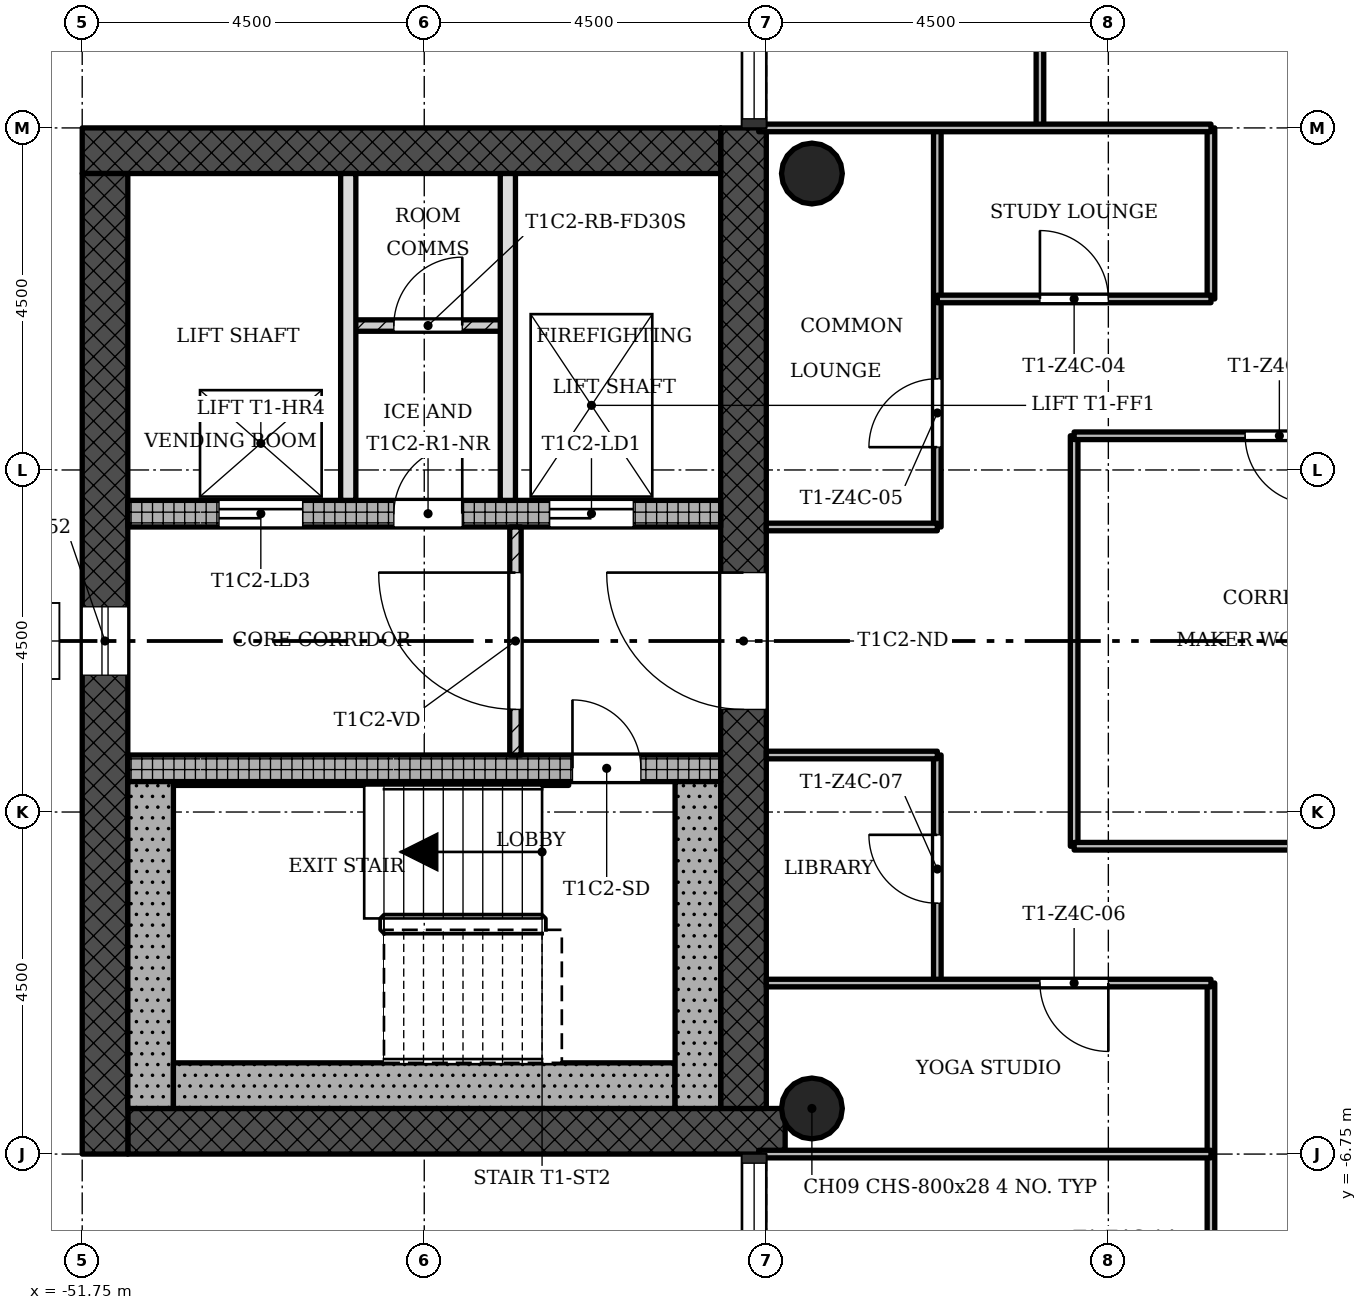
"""IFC4 building model, lengths in metres.
Left out: names, types, materials, properties, quantities, classifications, styles, units other than length and angle.
Written with IfcOpenShell. Run it as: python <this file> out.ifc"""

import sys

from ifc_helpers import new_model, si_unit, direction, frame, frame_2d, origin, origin_2d, place, context, subcontext, project, spatial, rectangle, hollow_circle, extrude, element, fill, save


model = new_model("IFC4")
c1 = context("Model", 3, precision=1e-05, world=origin(), true_north=direction((0.0, 1.0)))
c2 = subcontext(c1, "Body", "Model", "MODEL_VIEW")
j1 = project(units=[si_unit("LENGTHUNIT", "METRE"), si_unit("PLANEANGLEUNIT", "RADIAN")], contexts=[c1])
p1 = place(None, origin())
s1 = spatial("IfcSite", under=j1, at=p1, CompositionType="ELEMENT")
p2 = place(p1, origin())
s2 = spatial("IfcBuilding", under=s1, at=p2, CompositionType="ELEMENT")
p3 = place(p2, frame((0.0, 0.0, 189.2)))
s3 = spatial("IfcBuildingStorey", under=s2, at=p3, CompositionType="ELEMENT", Elevation=189.2)
p4 = place(p3, frame((-51.15, -6.45, 0.0), z_axis=(0.0, 0.0, 1.0), x_axis=(1.0, 0.0, 0.0)))
e1 = element("IfcWall", 1, at=p4, inside=s3, PredefinedType="SHEAR", context=c2, shape_type="SweptSolid", body=[
    extrude(rectangle(XDim=8.648, YDim=0.6, at=frame_2d((4.324, 0.0))), origin(), (0.0, 0.0, 1.0), 3.4),
])
p5 = place(p3, frame((-43.05, -6.15, 0.0), z_axis=(0.0, 0.0, 1.0), x_axis=(0.0, 1.0, 0.0)))
e2 = element("IfcWall", 2, at=p5, inside=s3, PredefinedType="SHEAR", context=c2, shape_type="SweptSolid", body=[
    extrude(rectangle(XDim=12.9, YDim=0.6, at=frame_2d((6.45, 0.0))), origin(), (0.0, 0.0, 1.0), 3.4),
])
p6 = place(p5, frame((5.25, 0.0, 0.0)))
e3 = element("IfcOpeningElement", 3, at=p6, cuts=e2, PredefinedType="OPENING", context=c2, shape_type="SweptSolid", body=[
    extrude(rectangle(XDim=1.8, YDim=2.1, at=frame_2d((0.9, 1.05))), frame((0.0, 0.31, 0.0), z_axis=(0.0, -1.0, 0.0), x_axis=(1.0, 0.0, 0.0)), (0.0, 0.0, 1.0), 0.62),
])
p7 = place(p3, frame((-43.35, 6.45, 0.0), z_axis=(0.0, 0.0, 1.0), x_axis=(-1.0, 0.0, 0.0)))
e4 = element("IfcWall", 4, at=p7, inside=s3, PredefinedType="SHEAR", context=c2, shape_type="SweptSolid", body=[
    extrude(rectangle(XDim=8.4, YDim=0.6, at=frame_2d((4.2, 0.0))), origin(), (0.0, 0.0, 1.0), 3.4),
])
p8 = place(p3, frame((-51.45, 6.15, 0.0), z_axis=(0.0, 0.0, 1.0), x_axis=(0.0, -1.0, 0.0)))
e5 = element("IfcWall", 5, at=p8, inside=s3, PredefinedType="SHEAR", context=c2, shape_type="SweptSolid", body=[
    extrude(rectangle(XDim=12.9, YDim=0.6, at=frame_2d((6.45, 0.0))), origin(), (0.0, 0.0, 1.0), 3.4),
])
p9 = place(p8, frame((5.7, 0.0, 0.45)))
e6 = element("IfcOpeningElement", 6, at=p9, cuts=e5, PredefinedType="OPENING", context=c2, shape_type="SweptSolid", body=[
    extrude(rectangle(XDim=0.9, YDim=2.4, at=frame_2d((0.45, 1.2))), frame((0.0, 0.31, 0.0), z_axis=(0.0, -1.0, 0.0), x_axis=(1.0, 0.0, 0.0)), (0.0, 0.0, 1.0), 0.62),
])
p10 = place(p3, frame((-51.15, -1.675, 0.0), z_axis=(0.0, 0.0, 1.0), x_axis=(1.0, 0.0, 0.0)))
e7 = element("IfcWall", 7, at=p10, inside=s3, PredefinedType="SHEAR", context=c2, shape_type="SweptSolid", body=[
    extrude(rectangle(XDim=7.8, YDim=0.35, at=frame_2d((3.9, 0.0))), origin(), (0.0, 0.0, 1.0), 3.4),
])
p11 = place(p10, frame((5.85, 0.0, 0.0)))
e8 = element("IfcOpeningElement", 8, at=p11, cuts=e7, PredefinedType="OPENING", context=c2, shape_type="SweptSolid", body=[
    extrude(rectangle(XDim=0.9, YDim=2.1, at=frame_2d((0.45, 1.05))), frame((0.0, 0.185, 0.0), z_axis=(0.0, -1.0, 0.0), x_axis=(1.0, 0.0, 0.0)), (0.0, 0.0, 1.0), 0.37),
])
p12 = place(p3, frame((-51.15, 1.675, 0.0), z_axis=(0.0, 0.0, 1.0), x_axis=(1.0, 0.0, 0.0)))
e9 = element("IfcWall", 9, at=p12, inside=s3, PredefinedType="SHEAR", context=c2, shape_type="SweptSolid", body=[
    extrude(rectangle(XDim=7.8, YDim=0.35, at=frame_2d((3.9, 0.0))), origin(), (0.0, 0.0, 1.0), 3.4),
])
p13 = place(p12, frame((5.55, 0.0, 0.0)))
e10 = element("IfcOpeningElement", 10, at=p13, cuts=e9, PredefinedType="OPENING", context=c2, shape_type="SweptSolid", body=[
    extrude(rectangle(XDim=1.1, YDim=2.1, at=frame_2d((0.55, 1.05))), frame((0.0, 0.185, 0.0), z_axis=(0.0, -1.0, 0.0), x_axis=(1.0, 0.0, 0.0)), (0.0, 0.0, 1.0), 0.37),
])
p14 = place(p12, frame((1.2, 0.0, 0.0)))
e11 = element("IfcOpeningElement", 11, at=p14, cuts=e9, PredefinedType="OPENING", context=c2, shape_type="SweptSolid", body=[
    extrude(rectangle(XDim=1.1, YDim=2.1, at=frame_2d((0.55, 1.05))), frame((0.0, 0.185, 0.0), z_axis=(0.0, -1.0, 0.0), x_axis=(1.0, 0.0, 0.0)), (0.0, 0.0, 1.0), 0.37),
])
p15 = place(p12, frame((3.5, 0.0, 0.0)))
e12 = element("IfcOpeningElement", 12, at=p15, cuts=e9, PredefinedType="OPENING", context=c2, shape_type="SweptSolid", body=[
    extrude(rectangle(XDim=0.9, YDim=2.1, at=frame_2d((0.45, 1.05))), frame((0.0, 0.185, 0.0), z_axis=(0.0, -1.0, 0.0), x_axis=(1.0, 0.0, 0.0)), (0.0, 0.0, 1.0), 0.37),
])
for number, where, z_axis, x_axis in (
    (13, (-42.15, -6.15, 0.0), (0.0, 0.0, 1.0), (1.0, 0.0, 0.0)),
    (14, (-42.15, 6.15, 0.0), (0.0, 0.0, 1.0), (1.0, 0.0, 0.0)),
):
    element("IfcColumn", number, at=place(p3, frame(where, z_axis=z_axis, x_axis=x_axis)), inside=s3, PredefinedType="COLUMN", context=c2, shape_type="SweptSolid", body=[
        extrude(hollow_circle(Radius=0.4, WallThickness=0.028, at=origin_2d()), origin(), (0.0, 0.0, 1.0), 3.4),
    ])
p16 = place(p3, frame((-46.05, 1.5, 0.0), z_axis=(0.0, 0.0, 1.0), x_axis=(0.0, -1.0, 0.0)))
e15 = element("IfcWall", 15, at=p16, inside=s3, PredefinedType="PARTITIONING", context=c2, shape_type="SweptSolid", body=[
    extrude(rectangle(XDim=3.0, YDim=0.15, at=frame_2d((1.5, 0.0))), origin(), (0.0, 0.0, 1.0), 3.0),
])
p17 = place(p16, frame((0.6, 0.0, 0.0)))
e16 = element("IfcOpeningElement", 16, at=p17, cuts=e15, PredefinedType="OPENING", context=c2, shape_type="SweptSolid", body=[
    extrude(rectangle(XDim=1.8, YDim=2.1, at=frame_2d((0.9, 1.05))), frame((0.0, 0.085, 0.0), z_axis=(0.0, -1.0, 0.0), x_axis=(1.0, 0.0, 0.0)), (0.0, 0.0, 1.0), 0.17),
])
for number, where, z_axis, x_axis in (
    (17, (-48.25, 6.15, 0.0), (0.0, 0.0, 1.0), (0.0, -1.0, 0.0)),
    (18, (-46.15, 6.15, 0.0), (0.0, 0.0, 1.0), (0.0, -1.0, 0.0)),
):
    element("IfcWall", number, at=place(p3, frame(where, z_axis=z_axis, x_axis=x_axis)), inside=s3, PredefinedType="SOLIDWALL", context=c2, shape_type="SweptSolid", body=[
        extrude(rectangle(XDim=4.3, YDim=0.2, at=frame_2d((2.15, 0.0))), origin(), (0.0, 0.0, 1.0), 3.0),
    ])
p18 = place(p3, frame((-46.15, 4.15, 0.0), z_axis=(0.0, 0.0, 1.0), x_axis=(-1.0, 0.0, 0.0)))
e19 = element("IfcWall", 19, at=p18, inside=s3, PredefinedType="PARTITIONING", context=c2, shape_type="SweptSolid", body=[
    extrude(rectangle(XDim=2.1, YDim=0.15, at=frame_2d((1.05, 0.0))), origin(), (0.0, 0.0, 1.0), 3.0),
])
p19 = place(p18, frame((0.6, 0.0, 0.0)))
e20 = element("IfcOpeningElement", 20, at=p19, cuts=e19, PredefinedType="OPENING", context=c2, shape_type="SweptSolid", body=[
    extrude(rectangle(XDim=0.9, YDim=2.1, at=frame_2d((0.45, 1.05))), frame((0.0, 0.085, 0.0), z_axis=(0.0, -1.0, 0.0), x_axis=(1.0, 0.0, 0.0)), (0.0, 0.0, 1.0), 0.17),
])
p20 = place(p3, frame((-40.5, -4.5, 0.0), z_axis=(0.0, 0.0, 1.0), x_axis=(0.0, 1.0, 0.0)))
e21 = element("IfcWall", 21, at=p20, inside=s3, PredefinedType="PARTITIONING", context=c2, shape_type="SweptSolid", body=[
    extrude(rectangle(XDim=3.0, YDim=0.1, at=frame_2d((1.5, 0.0))), origin(), (0.0, 0.0, 1.0), 3.0),
])
p21 = place(p20, frame((1.05, 0.0, 0.0)))
e22 = element("IfcOpeningElement", 22, at=p21, cuts=e21, PredefinedType="OPENING", context=c2, shape_type="SweptSolid", body=[
    extrude(rectangle(XDim=0.9, YDim=2.1, at=frame_2d((0.45, 1.05))), frame((0.0, 0.06, 0.0), z_axis=(0.0, -1.0, 0.0), x_axis=(1.0, 0.0, 0.0)), (0.0, 0.0, 1.0), 0.12),
])
p22 = place(p3, frame((-40.5, 1.5, 0.0), z_axis=(0.0, 0.0, 1.0), x_axis=(0.0, 1.0, 0.0)))
e23 = element("IfcWall", 23, at=p22, inside=s3, PredefinedType="PARTITIONING", context=c2, shape_type="SweptSolid", body=[
    extrude(rectangle(XDim=5.25, YDim=0.1, at=frame_2d((2.625, 0.0))), origin(), (0.0, 0.0, 1.0), 3.0),
])
p23 = place(p22, frame((1.05, 0.0, 0.0)))
e24 = element("IfcOpeningElement", 24, at=p23, cuts=e23, PredefinedType="OPENING", context=c2, shape_type="SweptSolid", body=[
    extrude(rectangle(XDim=0.9, YDim=2.1, at=frame_2d((0.45, 1.05))), frame((0.0, 0.06, 0.0), z_axis=(0.0, -1.0, 0.0), x_axis=(1.0, 0.0, 0.0)), (0.0, 0.0, 1.0), 0.12),
])
p24 = place(p3, frame((-39.15, 6.75, 0.0), z_axis=(0.0, 0.0, 1.0), x_axis=(0.0, 1.0, 0.0)))
e25 = element("IfcWall", 25, at=p24, inside=s3, PredefinedType="PARTITIONING", context=c2, shape_type="SweptSolid", body=[
    extrude(rectangle(XDim=4.5, YDim=0.1, at=frame_2d((2.25, 0.0))), origin(), (0.0, 0.0, 1.0), 3.0),
])
p25 = place(p24, frame((1.8, 0.0, 0.0)))
e26 = element("IfcOpeningElement", 26, at=p25, cuts=e25, PredefinedType="OPENING", context=c2, shape_type="SweptSolid", body=[
    extrude(rectangle(XDim=0.9, YDim=2.1, at=frame_2d((0.45, 1.05))), frame((0.0, 0.06, 0.0), z_axis=(0.0, -1.0, 0.0), x_axis=(1.0, 0.0, 0.0)), (0.0, 0.0, 1.0), 0.12),
])
p26 = place(p3, frame((-38.7, -2.7, 0.0), z_axis=(0.0, 0.0, 1.0), x_axis=(0.0, 1.0, 0.0)))
e27 = element("IfcWall", 27, at=p26, inside=s3, PredefinedType="PARTITIONING", context=c2, shape_type="SweptSolid", body=[
    extrude(rectangle(XDim=5.4, YDim=0.1, at=frame_2d((2.7, 0.0))), origin(), (0.0, 0.0, 1.0), 3.0),
])
p27 = place(p3, frame((-36.9, -11.25, 0.0), z_axis=(0.0, 0.0, 1.0), x_axis=(0.0, 1.0, 0.0)))
e28 = element("IfcWall", 28, at=p27, inside=s3, PredefinedType="PARTITIONING", context=c2, shape_type="SweptSolid", body=[
    extrude(rectangle(XDim=6.75, YDim=0.1, at=frame_2d((3.375, 0.0))), origin(), (0.0, 0.0, 1.0), 3.0),
])
p28 = place(p27, frame((1.8, 0.0, 0.0)))
e29 = element("IfcOpeningElement", 29, at=p28, cuts=e28, PredefinedType="OPENING", context=c2, shape_type="SweptSolid", body=[
    extrude(rectangle(XDim=0.9, YDim=2.1, at=frame_2d((0.45, 1.05))), frame((0.0, 0.06, 0.0), z_axis=(0.0, -1.0, 0.0), x_axis=(1.0, 0.0, 0.0)), (0.0, 0.0, 1.0), 0.12),
])
p29 = place(p3, frame((-36.9, 4.5, 0.0), z_axis=(0.0, 0.0, 1.0), x_axis=(0.0, 1.0, 0.0)))
e30 = element("IfcWall", 30, at=p29, inside=s3, PredefinedType="PARTITIONING", context=c2, shape_type="SweptSolid", body=[
    extrude(rectangle(XDim=2.25, YDim=0.1, at=frame_2d((1.125, 0.0))), origin(), (0.0, 0.0, 1.0), 3.0),
])
p30 = place(p3, frame((-42.85, -6.75, 0.0), z_axis=(0.0, 0.0, 1.0), x_axis=(1.0, 0.0, 0.0)))
e31 = element("IfcWall", 31, at=p30, inside=s3, PredefinedType="PARTITIONING", context=c2, shape_type="SweptSolid", body=[
    extrude(rectangle(XDim=5.95, YDim=0.1, at=frame_2d((2.975, 0.0))), origin(), (0.0, 0.0, 1.0), 3.0),
])
p31 = place(p3, frame((-42.75, -4.5, 0.0), z_axis=(0.0, 0.0, 1.0), x_axis=(1.0, 0.0, 0.0)))
e32 = element("IfcWall", 32, at=p31, inside=s3, PredefinedType="PARTITIONING", context=c2, shape_type="SweptSolid", body=[
    extrude(rectangle(XDim=5.85, YDim=0.1, at=frame_2d((2.925, 0.0))), origin(), (0.0, 0.0, 1.0), 3.0),
])
p32 = place(p31, frame((3.6, 0.0, 0.0)))
e33 = element("IfcOpeningElement", 33, at=p32, cuts=e32, PredefinedType="OPENING", context=c2, shape_type="SweptSolid", body=[
    extrude(rectangle(XDim=0.9, YDim=2.1, at=frame_2d((0.45, 1.05))), frame((0.0, 0.06, 0.0), z_axis=(0.0, -1.0, 0.0), x_axis=(1.0, 0.0, 0.0)), (0.0, 0.0, 1.0), 0.12),
])
p33 = place(p3, frame((-38.7, -2.7, 0.0), z_axis=(0.0, 0.0, 1.0), x_axis=(1.0, 0.0, 0.0)))
e34 = element("IfcWall", 34, at=p33, inside=s3, PredefinedType="PARTITIONING", context=c2, shape_type="SweptSolid", body=[
    extrude(rectangle(XDim=5.4, YDim=0.1, at=frame_2d((2.7, 0.0))), origin(), (0.0, 0.0, 1.0), 3.0),
])
for number, where, z_axis, x_axis in (
    (35, (-42.75, -1.5, 0.0), (0.0, 0.0, 1.0), (1.0, 0.0, 0.0)),
    (36, (-42.75, 1.5, 0.0), (0.0, 0.0, 1.0), (1.0, 0.0, 0.0)),
):
    element("IfcWall", number, at=place(p3, frame(where, z_axis=z_axis, x_axis=x_axis)), inside=s3, PredefinedType="PARTITIONING", context=c2, shape_type="SweptSolid", body=[
        extrude(rectangle(XDim=2.25, YDim=0.1, at=frame_2d((1.125, 0.0))), origin(), (0.0, 0.0, 1.0), 3.0),
    ])
p34 = place(p3, frame((-38.7, 2.7, 0.0), z_axis=(0.0, 0.0, 1.0), x_axis=(1.0, 0.0, 0.0)))
e37 = element("IfcWall", 37, at=p34, inside=s3, PredefinedType="PARTITIONING", context=c2, shape_type="SweptSolid", body=[
    extrude(rectangle(XDim=5.4, YDim=0.1, at=frame_2d((2.7, 0.0))), origin(), (0.0, 0.0, 1.0), 3.0),
])
p35 = place(p34, frame((2.25, 0.0, 0.0)))
e38 = element("IfcOpeningElement", 38, at=p35, cuts=e37, PredefinedType="OPENING", context=c2, shape_type="SweptSolid", body=[
    extrude(rectangle(XDim=0.9, YDim=2.1, at=frame_2d((0.45, 1.05))), frame((0.0, 0.06, 0.0), z_axis=(0.0, -1.0, 0.0), x_axis=(1.0, 0.0, 0.0)), (0.0, 0.0, 1.0), 0.12),
])
p36 = place(p3, frame((-40.5, 4.5, 0.0), z_axis=(0.0, 0.0, 1.0), x_axis=(1.0, 0.0, 0.0)))
e39 = element("IfcWall", 39, at=p36, inside=s3, PredefinedType="PARTITIONING", context=c2, shape_type="SweptSolid", body=[
    extrude(rectangle(XDim=3.6, YDim=0.1, at=frame_2d((1.8, 0.0))), origin(), (0.0, 0.0, 1.0), 3.0),
])
p37 = place(p36, frame((1.35, 0.0, 0.0)))
e40 = element("IfcOpeningElement", 40, at=p37, cuts=e39, PredefinedType="OPENING", context=c2, shape_type="SweptSolid", body=[
    extrude(rectangle(XDim=0.9, YDim=2.1, at=frame_2d((0.45, 1.05))), frame((0.0, 0.06, 0.0), z_axis=(0.0, -1.0, 0.0), x_axis=(1.0, 0.0, 0.0)), (0.0, 0.0, 1.0), 0.12),
])
p38 = place(p3, frame((-42.85, 6.75, 0.0), z_axis=(0.0, 0.0, 1.0), x_axis=(1.0, 0.0, 0.0)))
e41 = element("IfcWall", 41, at=p38, inside=s3, PredefinedType="PARTITIONING", context=c2, shape_type="SweptSolid", body=[
    extrude(rectangle(XDim=5.95, YDim=0.1, at=frame_2d((2.975, 0.0))), origin(), (0.0, 0.0, 1.0), 3.0),
])
p39 = place(p3, frame((-50.85, -1.85, 0.0), z_axis=(0.0, 0.0, 1.0), x_axis=(0.0, -1.0, 0.0)))
e42 = element("IfcWall", 42, at=p39, inside=s3, PredefinedType="SHEAR", context=c2, shape_type="SweptSolid", body=[
    extrude(rectangle(XDim=4.3, YDim=0.6, at=frame_2d((2.15, 0.0))), origin(), (0.0, 0.0, 1.0), 3.4),
])
p40 = place(p3, frame((-43.95, -5.85, 0.0), z_axis=(0.0, 0.0, 1.0), x_axis=(-1.0, 0.0, 0.0)))
e43 = element("IfcWall", 43, at=p40, inside=s3, PredefinedType="SHEAR", context=c2, shape_type="SweptSolid", body=[
    extrude(rectangle(XDim=6.6, YDim=0.6, at=frame_2d((3.3, 0.0))), origin(), (0.0, 0.0, 1.0), 3.4),
])
p41 = place(p3, frame((-43.65, -1.85, 0.0), z_axis=(0.0, 0.0, 1.0), x_axis=(0.0, -1.0, 0.0)))
e44 = element("IfcWall", 44, at=p41, inside=s3, PredefinedType="SHEAR", context=c2, shape_type="SweptSolid", body=[
    extrude(rectangle(XDim=4.3, YDim=0.6, at=frame_2d((2.15, 0.0))), origin(), (0.0, 0.0, 1.0), 3.4),
])
p42 = place(p3, frame((-45.35, -1.875, 0.0), z_axis=(0.0, 0.0, 1.0), x_axis=(-1.0, 0.0, 0.0)))
e45 = element("IfcWall", 45, at=p42, inside=s3, PredefinedType="SHEAR", context=c2, shape_type="SweptSolid", body=[
    extrude(rectangle(XDim=5.2, YDim=0.05, at=frame_2d((2.6, 0.0))), origin(), (0.0, 0.0, 1.0), 3.4),
])
p43 = place(p9, origin())
e46 = element("IfcWindow", 46, at=p43, inside=s3, PartitioningType="SINGLE_PANEL", PredefinedType="WINDOW", context=c2, shape_type="SweptSolid", body=[
    extrude(rectangle(XDim=0.9, YDim=2.4, at=frame_2d((0.45, 1.2))), frame((0.0, 0.03, 0.0), z_axis=(0.0, -1.0, 0.0), x_axis=(1.0, 0.0, 0.0)), (0.0, 0.0, 1.0), 0.06),
])
fill(e6, e46)
p44 = place(p17, origin())
e47 = element("IfcDoor", 47, at=p44, inside=s3, OperationType="SINGLE_SWING_LEFT", PredefinedType="DOOR", context=c2, shape_type="SweptSolid", body=[
    extrude(rectangle(XDim=1.8, YDim=2.1, at=frame_2d((0.9, 1.05))), frame((0.0, 0.025, 0.0), z_axis=(0.0, -1.0, 0.0), x_axis=(1.0, 0.0, 0.0)), (0.0, 0.0, 1.0), 0.05),
])
fill(e16, e47)
p45 = place(p19, origin())
e48 = element("IfcDoor", 48, at=p45, inside=s3, OperationType="SINGLE_SWING_LEFT", PredefinedType="DOOR", context=c2, shape_type="SweptSolid", body=[
    extrude(rectangle(XDim=0.9, YDim=2.1, at=frame_2d((0.45, 1.05))), frame((0.0, 0.025, 0.0), z_axis=(0.0, -1.0, 0.0), x_axis=(1.0, 0.0, 0.0)), (0.0, 0.0, 1.0), 0.05),
])
fill(e20, e48)
p46 = place(p35, origin())
e49 = element("IfcDoor", 49, at=p46, inside=s3, OperationType="SINGLE_SWING_RIGHT", PredefinedType="DOOR", context=c2, shape_type="SweptSolid", body=[
    extrude(rectangle(XDim=0.9, YDim=2.1, at=frame_2d((0.45, 1.05))), frame((0.0, 0.025, 0.0), z_axis=(0.0, -1.0, 0.0), x_axis=(1.0, 0.0, 0.0)), (0.0, 0.0, 1.0), 0.05),
])
fill(e38, e49)
p47 = place(p37, origin())
e50 = element("IfcDoor", 50, at=p47, inside=s3, OperationType="SINGLE_SWING_RIGHT", PredefinedType="DOOR", context=c2, shape_type="SweptSolid", body=[
    extrude(rectangle(XDim=0.9, YDim=2.1, at=frame_2d((0.45, 1.05))), frame((0.0, 0.025, 0.0), z_axis=(0.0, -1.0, 0.0), x_axis=(1.0, 0.0, 0.0)), (0.0, 0.0, 1.0), 0.05),
])
fill(e40, e50)
p48 = place(p23, origin())
e51 = element("IfcDoor", 51, at=p48, inside=s3, OperationType="SINGLE_SWING_RIGHT", PredefinedType="DOOR", context=c2, shape_type="SweptSolid", body=[
    extrude(rectangle(XDim=0.9, YDim=2.1, at=frame_2d((0.45, 1.05))), frame((0.0, 0.025, 0.0), z_axis=(0.0, -1.0, 0.0), x_axis=(1.0, 0.0, 0.0)), (0.0, 0.0, 1.0), 0.05),
])
fill(e24, e51)
p49 = place(p32, origin())
e52 = element("IfcDoor", 52, at=p49, inside=s3, OperationType="SINGLE_SWING_RIGHT", PredefinedType="DOOR", context=c2, shape_type="SweptSolid", body=[
    extrude(rectangle(XDim=0.9, YDim=2.1, at=frame_2d((0.45, 1.05))), frame((0.0, 0.025, 0.0), z_axis=(0.0, -1.0, 0.0), x_axis=(1.0, 0.0, 0.0)), (0.0, 0.0, 1.0), 0.05),
])
fill(e33, e52)
p50 = place(p21, origin())
e53 = element("IfcDoor", 53, at=p50, inside=s3, OperationType="SINGLE_SWING_LEFT", PredefinedType="DOOR", context=c2, shape_type="SweptSolid", body=[
    extrude(rectangle(XDim=0.9, YDim=2.1, at=frame_2d((0.45, 1.05))), frame((0.0, 0.025, 0.0), z_axis=(0.0, -1.0, 0.0), x_axis=(1.0, 0.0, 0.0)), (0.0, 0.0, 1.0), 0.05),
])
fill(e22, e53)
p51 = place(p11, origin())
e54 = element("IfcDoor", 54, at=p51, inside=s3, OperationType="SINGLE_SWING_RIGHT", PredefinedType="DOOR", context=c2, shape_type="SweptSolid", body=[
    extrude(rectangle(XDim=0.9, YDim=2.1, at=frame_2d((0.45, 1.05))), frame((0.0, 0.025, 0.0), z_axis=(0.0, -1.0, 0.0), x_axis=(1.0, 0.0, 0.0)), (0.0, 0.0, 1.0), 0.05),
])
fill(e8, e54)
p52 = place(p13, origin())
e55 = element("IfcDoor", 55, at=p52, inside=s3, OperationType="SLIDING_TO_LEFT", PredefinedType="DOOR", context=c2, shape_type="SweptSolid", body=[
    extrude(rectangle(XDim=1.1, YDim=2.1, at=frame_2d((0.55, 1.05))), frame((0.0, 0.025, 0.0), z_axis=(0.0, -1.0, 0.0), x_axis=(1.0, 0.0, 0.0)), (0.0, 0.0, 1.0), 0.05),
])
fill(e10, e55)
p53 = place(p14, origin())
e56 = element("IfcDoor", 56, at=p53, inside=s3, OperationType="SLIDING_TO_LEFT", PredefinedType="DOOR", context=c2, shape_type="SweptSolid", body=[
    extrude(rectangle(XDim=1.1, YDim=2.1, at=frame_2d((0.55, 1.05))), frame((0.0, 0.025, 0.0), z_axis=(0.0, -1.0, 0.0), x_axis=(1.0, 0.0, 0.0)), (0.0, 0.0, 1.0), 0.05),
])
fill(e11, e56)
p54 = place(p15, origin())
e57 = element("IfcDoor", 57, at=p54, inside=s3, OperationType="SINGLE_SWING_LEFT", PredefinedType="DOOR", context=c2, shape_type="SweptSolid", body=[
    extrude(rectangle(XDim=0.9, YDim=2.1, at=frame_2d((0.45, 1.05))), frame((0.0, 0.025, 0.0), z_axis=(0.0, -1.0, 0.0), x_axis=(1.0, 0.0, 0.0)), (0.0, 0.0, 1.0), 0.05),
])
fill(e12, e57)
p55 = place(p6, origin())
e58 = element("IfcDoor", 58, at=p55, inside=s3, OperationType="SINGLE_SWING_LEFT", PredefinedType="DOOR", context=c2, shape_type="SweptSolid", body=[
    extrude(rectangle(XDim=1.8, YDim=2.1, at=frame_2d((0.9, 1.05))), frame((0.0, 0.025, 0.0), z_axis=(0.0, -1.0, 0.0), x_axis=(1.0, 0.0, 0.0)), (0.0, 0.0, 1.0), 0.05),
])
fill(e3, e58)
save(model, sys.argv[1])
